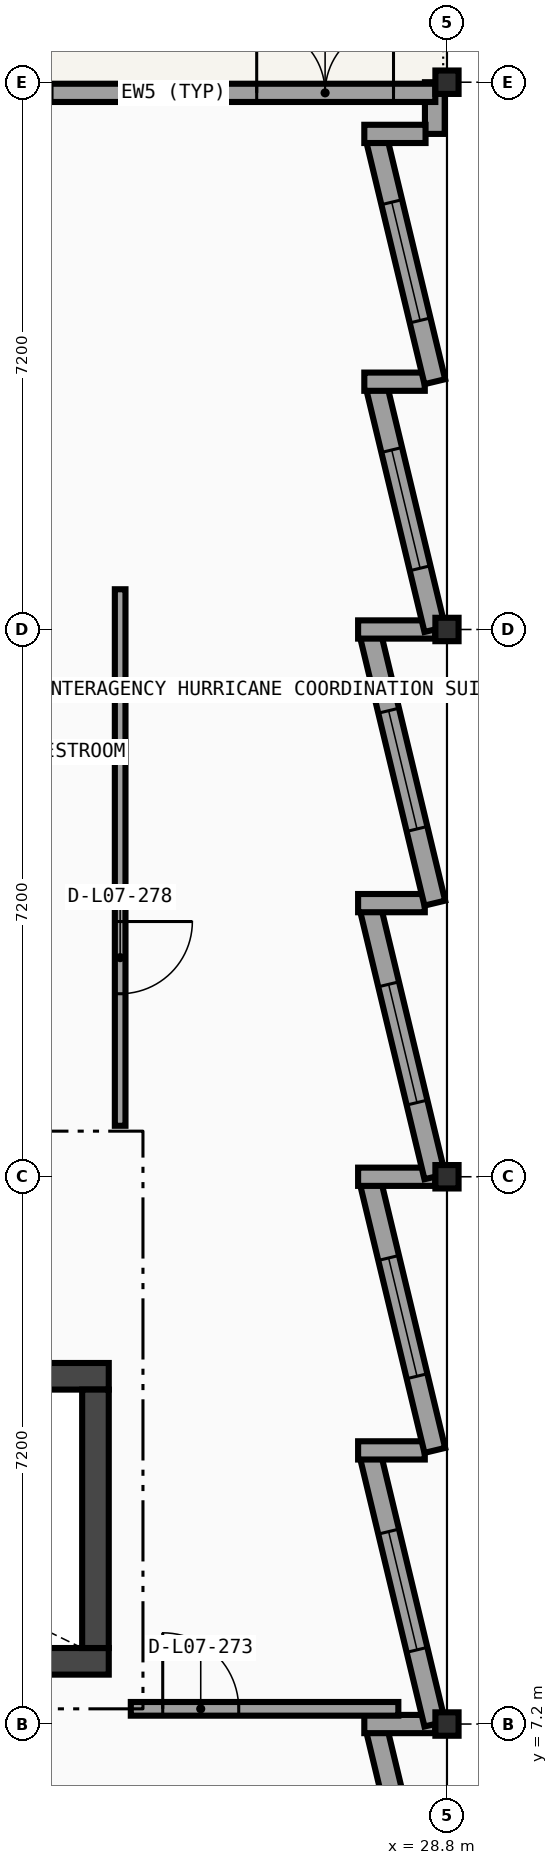
"""IFC4 building model, lengths in metres.
Left out: names, types, materials, properties, quantities, classifications, styles, units other than length and angle.
Written with IfcOpenShell. Run it as: python <this file> out.ifc"""

import sys

from ifc_helpers import new_model, si_unit, direction, frame, frame_2d, origin, origin_2d, place, context, subcontext, project, spatial, rectangle, i_section, extrude, element, fill, save


model = new_model("IFC4")
c1 = context("Model", 3, precision=1e-05, world=origin(), true_north=direction((0.0, 1.0)))
c2 = subcontext(c1, "Body", "Model", "MODEL_VIEW")
j1 = project(units=[si_unit("LENGTHUNIT", "METRE"), si_unit("PLANEANGLEUNIT", "RADIAN")], contexts=[c1])
p1 = place(None, origin())
s1 = spatial("IfcSite", under=j1, at=p1, CompositionType="ELEMENT")
p2 = place(p1, origin())
s2 = spatial("IfcBuilding", under=s1, at=p2, CompositionType="ELEMENT")
p3 = place(p2, frame((0.0, 0.0, 31.05)))
s3 = spatial("IfcBuildingStorey", under=s2, at=p3, CompositionType="ELEMENT", Elevation=31.05)
for number, where, z_axis, x_axis in (
    (1, (28.8, 7.2, 0.0), (0.0, 0.0, 1.0), (1.0, 0.0, 0.0)),
    (2, (28.8, 14.4, 0.0), (0.0, 0.0, 1.0), (1.0, 0.0, 0.0)),
    (3, (28.8, 21.6, 0.0), (0.0, 0.0, 1.0), (1.0, 0.0, 0.0)),
    (4, (28.8, 28.8, 0.0), (0.0, 0.0, 1.0), (1.0, 0.0, 0.0)),
):
    element("IfcColumn", number, at=place(p3, frame(where, z_axis=z_axis, x_axis=x_axis)), inside=s3, PredefinedType="COLUMN", context=c2, shape_type="SweptSolid", body=[
        extrude(i_section(OverallWidth=0.305, OverallDepth=0.308, WebThickness=0.01, FlangeThickness=0.015, FilletRadius=0.015, at=origin_2d()), origin(), (0.0, 0.0, 1.0), 4.2),
    ])
p4 = place(p3, frame((28.64, 3.94, 0.0), z_axis=(0.0, 0.0, 1.0), x_axis=(-0.233443812137, 0.972370292931, 0.0)))
e5 = element("IfcWall", 5, at=p4, inside=s3, PredefinedType="SOLIDWALL", context=c2, shape_type="SweptSolid", body=[
    extrude(rectangle(XDim=3.258, YDim=0.28, at=frame_2d((1.629, 0.0))), origin(), (0.0, 0.0, 1.0), 3.95),
])
p5 = place(p4, frame((0.829, 0.0, 0.8)))
e6 = element("IfcOpeningElement", 6, at=p5, cuts=e5, PredefinedType="OPENING", context=c2, shape_type="SweptSolid", body=[
    extrude(rectangle(XDim=1.6, YDim=1.75, at=frame_2d((0.8, 0.875))), frame((0.0, 0.15, 0.0), z_axis=(0.0, -1.0, 0.0), x_axis=(1.0, 0.0, 0.0)), (0.0, 0.0, 1.0), 0.3),
])
p6 = place(p3, frame((27.712, 7.2, 0.0), z_axis=(0.0, 0.0, 1.0), x_axis=(1.0, 0.0, 0.0)))
e7 = element("IfcWall", 7, at=p6, inside=s3, PredefinedType="SOLIDWALL", context=c2, shape_type="SweptSolid", body=[
    extrude(rectangle(XDim=0.933, YDim=0.24, at=frame_2d((0.467, 0.0))), origin(), (0.0, 0.0, 1.0), 3.95),
])
p7 = place(p3, frame((28.64, 7.2, 0.0), z_axis=(0.0, 0.0, 1.0), x_axis=(-0.233431827365, 0.972373170122, 0.0)))
e8 = element("IfcWall", 8, at=p7, inside=s3, PredefinedType="SOLIDWALL", context=c2, shape_type="SweptSolid", body=[
    extrude(rectangle(XDim=3.607, YDim=0.28, at=frame_2d((1.804, 0.0))), origin(), (0.0, 0.0, 1.0), 3.95),
])
p8 = place(p7, frame((1.004, 0.0, 0.8)))
e9 = element("IfcOpeningElement", 9, at=p8, cuts=e8, PredefinedType="OPENING", context=c2, shape_type="SweptSolid", body=[
    extrude(rectangle(XDim=1.6, YDim=1.75, at=frame_2d((0.8, 0.875))), frame((0.0, 0.15, 0.0), z_axis=(0.0, -1.0, 0.0), x_axis=(1.0, 0.0, 0.0)), (0.0, 0.0, 1.0), 0.3),
])
p9 = place(p3, frame((27.631, 10.8, 0.0), z_axis=(0.0, 0.0, 1.0), x_axis=(1.0, 0.0, 0.0)))
e10 = element("IfcWall", 10, at=p9, inside=s3, PredefinedType="SOLIDWALL", context=c2, shape_type="SweptSolid", body=[
    extrude(rectangle(XDim=0.877, YDim=0.24, at=frame_2d((0.439, 0.0))), origin(), (0.0, 0.0, 1.0), 3.95),
])
p10 = place(p3, frame((28.64, 10.8, 0.0), z_axis=(0.0, 0.0, 1.0), x_axis=(-0.233431827365, 0.972373170122, 0.0)))
e11 = element("IfcWall", 11, at=p10, inside=s3, PredefinedType="SOLIDWALL", context=c2, shape_type="SweptSolid", body=[
    extrude(rectangle(XDim=3.607, YDim=0.28, at=frame_2d((1.804, 0.0))), origin(), (0.0, 0.0, 1.0), 3.95),
])
p11 = place(p10, frame((1.004, 0.0, 0.8)))
e12 = element("IfcOpeningElement", 12, at=p11, cuts=e11, PredefinedType="OPENING", context=c2, shape_type="SweptSolid", body=[
    extrude(rectangle(XDim=1.6, YDim=1.75, at=frame_2d((0.8, 0.875))), frame((0.0, 0.15, 0.0), z_axis=(0.0, -1.0, 0.0), x_axis=(1.0, 0.0, 0.0)), (0.0, 0.0, 1.0), 0.3),
])
p12 = place(p3, frame((27.631, 14.4, 0.0), z_axis=(0.0, 0.0, 1.0), x_axis=(1.0, 0.0, 0.0)))
e13 = element("IfcWall", 13, at=p12, inside=s3, PredefinedType="SOLIDWALL", context=c2, shape_type="SweptSolid", body=[
    extrude(rectangle(XDim=1.015, YDim=0.24, at=frame_2d((0.507, 0.0))), origin(), (0.0, 0.0, 1.0), 3.95),
])
p13 = place(p3, frame((28.64, 14.4, 0.0), z_axis=(0.0, 0.0, 1.0), x_axis=(-0.233416465917, 0.972376857725, 0.0)))
e14 = element("IfcWall", 14, at=p13, inside=s3, PredefinedType="SOLIDWALL", context=c2, shape_type="SweptSolid", body=[
    extrude(rectangle(XDim=3.607, YDim=0.28, at=frame_2d((1.804, 0.0))), origin(), (0.0, 0.0, 1.0), 3.95),
])
p14 = place(p13, frame((1.004, 0.0, 0.8)))
e15 = element("IfcOpeningElement", 15, at=p14, cuts=e14, PredefinedType="OPENING", context=c2, shape_type="SweptSolid", body=[
    extrude(rectangle(XDim=1.6, YDim=1.75, at=frame_2d((0.8, 0.875))), frame((0.0, 0.15, 0.0), z_axis=(0.0, -1.0, 0.0), x_axis=(1.0, 0.0, 0.0)), (0.0, 0.0, 1.0), 0.3),
])
p15 = place(p3, frame((27.631, 18.0, 0.0), z_axis=(0.0, 0.0, 1.0), x_axis=(1.0, 0.0, 0.0)))
e16 = element("IfcWall", 16, at=p15, inside=s3, PredefinedType="SOLIDWALL", context=c2, shape_type="SweptSolid", body=[
    extrude(rectangle(XDim=0.877, YDim=0.24, at=frame_2d((0.439, 0.0))), origin(), (0.0, 0.0, 1.0), 3.95),
])
p16 = place(p3, frame((28.64, 18.0, 0.0), z_axis=(0.0, 0.0, 1.0), x_axis=(-0.233431827365, 0.972373170122, 0.0)))
e17 = element("IfcWall", 17, at=p16, inside=s3, PredefinedType="SOLIDWALL", context=c2, shape_type="SweptSolid", body=[
    extrude(rectangle(XDim=3.607, YDim=0.28, at=frame_2d((1.804, 0.0))), origin(), (0.0, 0.0, 1.0), 3.95),
])
p17 = place(p16, frame((1.004, 0.0, 0.8)))
e18 = element("IfcOpeningElement", 18, at=p17, cuts=e17, PredefinedType="OPENING", context=c2, shape_type="SweptSolid", body=[
    extrude(rectangle(XDim=1.6, YDim=1.75, at=frame_2d((0.8, 0.875))), frame((0.0, 0.15, 0.0), z_axis=(0.0, -1.0, 0.0), x_axis=(1.0, 0.0, 0.0)), (0.0, 0.0, 1.0), 0.3),
])
p18 = place(p3, frame((27.631, 21.6, 0.0), z_axis=(0.0, 0.0, 1.0), x_axis=(1.0, 0.0, 0.0)))
e19 = element("IfcWall", 19, at=p18, inside=s3, PredefinedType="SOLIDWALL", context=c2, shape_type="SweptSolid", body=[
    extrude(rectangle(XDim=1.015, YDim=0.24, at=frame_2d((0.507, 0.0))), origin(), (0.0, 0.0, 1.0), 3.95),
])
p19 = place(p3, frame((28.64, 28.12, 0.0), z_axis=(0.0, 0.0, 1.0), x_axis=(0.0, 1.0, 0.0)))
e20 = element("IfcWall", 20, at=p19, inside=s3, PredefinedType="SOLIDWALL", context=c2, shape_type="SweptSolid", body=[
    extrude(rectangle(XDim=0.68, YDim=0.26, at=frame_2d((0.34, 0.0))), origin(), (0.0, 0.0, 1.0), 3.95),
])
p20 = place(p3, frame((28.64, 21.6, 0.0), z_axis=(0.0, 0.0, 1.0), x_axis=(-0.233460824675, 0.972366208453, 0.0)))
e21 = element("IfcWall", 21, at=p20, inside=s3, PredefinedType="SOLIDWALL", context=c2, shape_type="SweptSolid", body=[
    extrude(rectangle(XDim=3.258, YDim=0.28, at=frame_2d((1.629, 0.0))), origin(), (0.0, 0.0, 1.0), 3.95),
])
p21 = place(p20, frame((0.829, 0.0, 0.8)))
e22 = element("IfcOpeningElement", 22, at=p21, cuts=e21, PredefinedType="OPENING", context=c2, shape_type="SweptSolid", body=[
    extrude(rectangle(XDim=1.6, YDim=1.75, at=frame_2d((0.8, 0.875))), frame((0.0, 0.15, 0.0), z_axis=(0.0, -1.0, 0.0), x_axis=(1.0, 0.0, 0.0)), (0.0, 0.0, 1.0), 0.3),
])
p22 = place(p3, frame((27.712, 24.86, 0.0), z_axis=(0.0, 0.0, 1.0), x_axis=(1.0, 0.0, 0.0)))
e23 = element("IfcWall", 23, at=p22, inside=s3, PredefinedType="SOLIDWALL", context=c2, shape_type="SweptSolid", body=[
    extrude(rectangle(XDim=0.796, YDim=0.24, at=frame_2d((0.398, 0.0))), origin(), (0.0, 0.0, 1.0), 3.95),
])
p23 = place(p3, frame((28.64, 24.86, 0.0), z_axis=(0.0, 0.0, 1.0), x_axis=(-0.233460824675, 0.972366208453, 0.0)))
e24 = element("IfcWall", 24, at=p23, inside=s3, PredefinedType="SOLIDWALL", context=c2, shape_type="SweptSolid", body=[
    extrude(rectangle(XDim=3.258, YDim=0.28, at=frame_2d((1.629, 0.0))), origin(), (0.0, 0.0, 1.0), 3.95),
])
p24 = place(p23, frame((0.829, 0.0, 0.8)))
e25 = element("IfcOpeningElement", 25, at=p24, cuts=e24, PredefinedType="OPENING", context=c2, shape_type="SweptSolid", body=[
    extrude(rectangle(XDim=1.6, YDim=1.75, at=frame_2d((0.8, 0.875))), frame((0.0, 0.15, 0.0), z_axis=(0.0, -1.0, 0.0), x_axis=(1.0, 0.0, 0.0)), (0.0, 0.0, 1.0), 0.3),
])
p25 = place(p3, frame((27.712, 28.12, 0.0), z_axis=(0.0, 0.0, 1.0), x_axis=(1.0, 0.0, 0.0)))
e26 = element("IfcWall", 26, at=p25, inside=s3, PredefinedType="SOLIDWALL", context=c2, shape_type="SweptSolid", body=[
    extrude(rectangle(XDim=0.806, YDim=0.24, at=frame_2d((0.403, 0.0))), origin(), (0.0, 0.0, 1.0), 3.95),
])
p26 = place(p3, frame((28.646, 28.66, 0.0), z_axis=(0.0, 0.0, 1.0), x_axis=(-1.0, 0.0, 0.0)))
e27 = element("IfcWall", 27, at=p26, inside=s3, PredefinedType="SOLIDWALL", context=c2, shape_type="SweptSolid", body=[
    extrude(rectangle(XDim=6.893, YDim=0.24, at=frame_2d((3.447, 0.0))), origin(), (0.0, 0.0, 1.0), 3.95),
])
p27 = place(p26, frame((0.55, 0.0, 0.0)))
e28 = element("IfcOpeningElement", 28, at=p27, cuts=e27, PredefinedType="OPENING", context=c2, shape_type="SweptSolid", body=[
    extrude(rectangle(XDim=1.8, YDim=2.15, at=frame_2d((0.9, 1.075))), frame((0.0, 0.13, 0.0), z_axis=(0.0, -1.0, 0.0), x_axis=(1.0, 0.0, 0.0)), (0.0, 0.0, 1.0), 0.26),
])
p28 = place(p26, frame((5.043, 0.0, 0.85)))
e29 = element("IfcOpeningElement", 29, at=p28, cuts=e27, PredefinedType="OPENING", context=c2, shape_type="SweptSolid", body=[
    extrude(rectangle(XDim=1.2, YDim=1.95, at=frame_2d((0.6, 0.975))), frame((0.0, 0.13, 0.0), z_axis=(0.0, -1.0, 0.0), x_axis=(1.0, 0.0, 0.0)), (0.0, 0.0, 1.0), 0.26),
])
for number, where, z_axis, x_axis in (
    (30, (15.05, 8.025, 0.0), (0.0, 0.0, 1.0), (1.0, 0.0, 0.0)),
    (31, (24.35, 11.775, 0.0), (0.0, 0.0, 1.0), (-1.0, 0.0, 0.0)),
):
    element("IfcWall", number, at=place(p3, frame(where, z_axis=z_axis, x_axis=x_axis)), inside=s3, PredefinedType="SHEAR", context=c2, shape_type="SweptSolid", body=[
        extrude(rectangle(XDim=9.3, YDim=0.35, at=frame_2d((4.65, 0.0))), origin(), (0.0, 0.0, 1.0), 3.95),
    ])
p29 = place(p3, frame((24.175, 8.2, 0.0), z_axis=(0.0, 0.0, 1.0), x_axis=(0.0, 1.0, 0.0)))
e32 = element("IfcWall", 32, at=p29, inside=s3, PredefinedType="SHEAR", context=c2, shape_type="SweptSolid", body=[
    extrude(rectangle(XDim=3.4, YDim=0.35, at=frame_2d((1.7, 0.0))), origin(), (0.0, 0.0, 1.0), 3.95),
])
p30 = place(p3, frame((24.64, 7.4, 0.0), z_axis=(0.0, 0.0, 1.0), x_axis=(1.0, 0.0, 0.0)))
e33 = element("IfcWall", 33, at=p30, inside=s3, PredefinedType="PARTITIONING", context=c2, shape_type="SweptSolid", body=[
    extrude(rectangle(XDim=3.52, YDim=0.18, at=frame_2d((1.76, 0.0))), origin(), (0.0, 0.0, 1.0), 3.95),
])
p31 = place(p30, frame((0.42, 0.0, 0.0)))
e34 = element("IfcOpeningElement", 34, at=p31, cuts=e33, PredefinedType="OPENING", context=c2, shape_type="SweptSolid", body=[
    extrude(rectangle(XDim=1.0, YDim=2.1, at=frame_2d((0.5, 1.05))), frame((0.0, 0.1, 0.0), z_axis=(0.0, -1.0, 0.0), x_axis=(1.0, 0.0, 0.0)), (0.0, 0.0, 1.0), 0.2),
])
p32 = place(p3, frame((24.5, 15.071, 0.0), z_axis=(0.0, 0.0, 1.0), x_axis=(0.0, 1.0, 0.0)))
e35 = element("IfcWall", 35, at=p32, inside=s3, PredefinedType="PARTITIONING", context=c2, shape_type="SweptSolid", body=[
    extrude(rectangle(XDim=7.059, YDim=0.14, at=frame_2d((3.529, 0.0))), origin(), (0.0, 0.0, 1.0), 3.95),
])
p33 = place(p32, frame((1.737, 0.0, 0.0)))
e36 = element("IfcOpeningElement", 36, at=p33, cuts=e35, PredefinedType="OPENING", context=c2, shape_type="SweptSolid", body=[
    extrude(rectangle(XDim=0.95, YDim=2.08, at=frame_2d((0.475, 1.04))), frame((0.0, 0.08, 0.0), z_axis=(0.0, -1.0, 0.0), x_axis=(1.0, 0.0, 0.0)), (0.0, 0.0, 1.0), 0.16),
])
p34 = place(p8, origin())
e37 = element("IfcWindow", 37, at=p34, inside=s3, PartitioningType="SINGLE_PANEL", PredefinedType="WINDOW", context=c2, shape_type="SweptSolid", body=[
    extrude(rectangle(XDim=1.6, YDim=1.75, at=frame_2d((0.8, 0.875))), frame((0.0, 0.03, 0.0), z_axis=(0.0, -1.0, 0.0), x_axis=(1.0, 0.0, 0.0)), (0.0, 0.0, 1.0), 0.06),
])
fill(e9, e37)
p35 = place(p11, origin())
e38 = element("IfcWindow", 38, at=p35, inside=s3, PartitioningType="SINGLE_PANEL", PredefinedType="WINDOW", context=c2, shape_type="SweptSolid", body=[
    extrude(rectangle(XDim=1.6, YDim=1.75, at=frame_2d((0.8, 0.875))), frame((0.0, 0.03, 0.0), z_axis=(0.0, -1.0, 0.0), x_axis=(1.0, 0.0, 0.0)), (0.0, 0.0, 1.0), 0.06),
])
fill(e12, e38)
p36 = place(p14, origin())
e39 = element("IfcWindow", 39, at=p36, inside=s3, PartitioningType="SINGLE_PANEL", PredefinedType="WINDOW", context=c2, shape_type="SweptSolid", body=[
    extrude(rectangle(XDim=1.6, YDim=1.75, at=frame_2d((0.8, 0.875))), frame((0.0, 0.03, 0.0), z_axis=(0.0, -1.0, 0.0), x_axis=(1.0, 0.0, 0.0)), (0.0, 0.0, 1.0), 0.06),
])
fill(e15, e39)
p37 = place(p17, origin())
e40 = element("IfcWindow", 40, at=p37, inside=s3, PartitioningType="SINGLE_PANEL", PredefinedType="WINDOW", context=c2, shape_type="SweptSolid", body=[
    extrude(rectangle(XDim=1.6, YDim=1.75, at=frame_2d((0.8, 0.875))), frame((0.0, 0.03, 0.0), z_axis=(0.0, -1.0, 0.0), x_axis=(1.0, 0.0, 0.0)), (0.0, 0.0, 1.0), 0.06),
])
fill(e18, e40)
p38 = place(p21, origin())
e41 = element("IfcWindow", 41, at=p38, inside=s3, PartitioningType="SINGLE_PANEL", PredefinedType="WINDOW", context=c2, shape_type="SweptSolid", body=[
    extrude(rectangle(XDim=1.6, YDim=1.75, at=frame_2d((0.8, 0.875))), frame((0.0, 0.03, 0.0), z_axis=(0.0, -1.0, 0.0), x_axis=(1.0, 0.0, 0.0)), (0.0, 0.0, 1.0), 0.06),
])
fill(e22, e41)
p39 = place(p24, origin())
e42 = element("IfcWindow", 42, at=p39, inside=s3, PartitioningType="SINGLE_PANEL", PredefinedType="WINDOW", context=c2, shape_type="SweptSolid", body=[
    extrude(rectangle(XDim=1.6, YDim=1.75, at=frame_2d((0.8, 0.875))), frame((0.0, 0.03, 0.0), z_axis=(0.0, -1.0, 0.0), x_axis=(1.0, 0.0, 0.0)), (0.0, 0.0, 1.0), 0.06),
])
fill(e25, e42)
p40 = place(p27, frame((1.8, 0.0, 0.0), z_axis=(0.0, 0.0, 1.0), x_axis=(-1.0, 0.0, 0.0)))
e43 = element("IfcDoor", 43, at=p40, inside=s3, OperationType="DOUBLE_DOOR_SINGLE_SWING", PredefinedType="DOOR", context=c2, shape_type="SweptSolid", body=[
    extrude(rectangle(XDim=1.8, YDim=2.15, at=frame_2d((0.9, 1.075))), frame((0.0, 0.025, 0.0), z_axis=(0.0, -1.0, 0.0), x_axis=(1.0, 0.0, 0.0)), (0.0, 0.0, 1.0), 0.05),
])
fill(e28, e43)
p41 = place(p28, origin())
e44 = element("IfcWindow", 44, at=p41, inside=s3, PartitioningType="SINGLE_PANEL", PredefinedType="WINDOW", context=c2, shape_type="SweptSolid", body=[
    extrude(rectangle(XDim=1.2, YDim=1.95, at=frame_2d((0.6, 0.975))), frame((0.0, 0.03, 0.0), z_axis=(0.0, -1.0, 0.0), x_axis=(1.0, 0.0, 0.0)), (0.0, 0.0, 1.0), 0.06),
])
fill(e29, e44)
p42 = place(p31, origin())
e45 = element("IfcDoor", 45, at=p42, inside=s3, OperationType="SINGLE_SWING_LEFT", PredefinedType="DOOR", context=c2, shape_type="SweptSolid", body=[
    extrude(rectangle(XDim=1.0, YDim=2.1, at=frame_2d((0.5, 1.05))), frame((0.0, 0.025, 0.0), z_axis=(0.0, -1.0, 0.0), x_axis=(1.0, 0.0, 0.0)), (0.0, 0.0, 1.0), 0.05),
])
fill(e34, e45)
p43 = place(p33, origin())
e46 = element("IfcDoor", 46, at=p43, inside=s3, OperationType="SINGLE_SWING_RIGHT", PredefinedType="DOOR", context=c2, shape_type="SweptSolid", body=[
    extrude(rectangle(XDim=0.95, YDim=2.08, at=frame_2d((0.475, 1.04))), frame((0.0, 0.025, 0.0), z_axis=(0.0, -1.0, 0.0), x_axis=(1.0, 0.0, 0.0)), (0.0, 0.0, 1.0), 0.05),
])
fill(e36, e46)
save(model, sys.argv[1])
